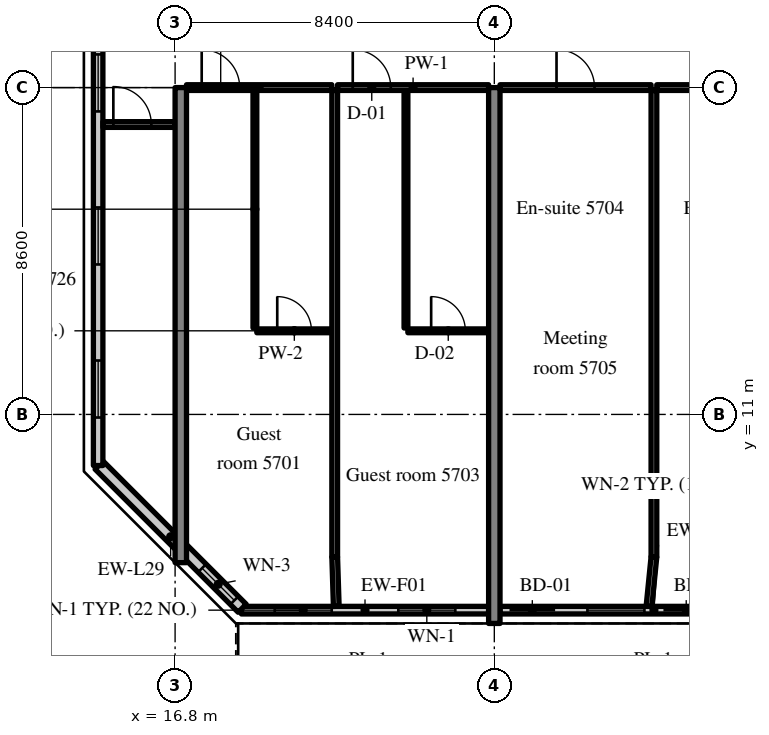
"""IFC4 building model, lengths in metres.
Left out: names, types, materials, properties, quantities, classifications, styles, units other than length and angle.
Written with IfcOpenShell. Run it as: python <this file> out.ifc"""

import sys

from ifc_helpers import new_model, si_unit, direction, frame, frame_2d, origin, place, context, subcontext, project, spatial, rectangle, extrude, source, transform, mapped, element, fill, save


model = new_model("IFC4")
c1 = context("Model", 3, precision=1e-05, world=origin(), true_north=direction((0.0, 1.0)))
c2 = subcontext(c1, "Body", "Model", "MODEL_VIEW")
j1 = project(units=[si_unit("LENGTHUNIT", "METRE"), si_unit("PLANEANGLEUNIT", "RADIAN")], contexts=[c1])
p1 = place(None, origin())
s1 = spatial("IfcSite", under=j1, at=p1, CompositionType="ELEMENT")
p2 = place(p1, origin())
s2 = spatial("IfcBuilding", under=s1, at=p2, CompositionType="ELEMENT")
p3 = place(p2, frame((0.0, 0.0, 237.4)))
s3 = spatial("IfcBuildingStorey", under=s2, at=p3, CompositionType="ELEMENT", Elevation=237.4)
m1 = source(origin(), c2, "Body", "SweptSolid", [
    extrude(rectangle(XDim=12.5, YDim=0.3, at=frame_2d((6.25, 0.0))), origin(), (0.0, 0.0, 1.0), 3.62),
])
p4 = place(p3, frame((16.95, 7.1, 0.0), z_axis=(0.0, 0.0, 1.0), x_axis=(0.0, 1.0, 0.0)))
e1 = element("IfcWall", 1, at=p4, inside=s3, PredefinedType="SHEAR", context=c2, shape_type="MappedRepresentation", body=[
    mapped(m1, transform((0.0, 0.0, 0.0), scale=1.0)),
])
m2 = source(origin(), c2, "Body", "SweptSolid", [
    extrude(rectangle(XDim=14.1, YDim=0.3, at=frame_2d((7.05, 0.0))), origin(), (0.0, 0.0, 1.0), 3.62),
])
p5 = place(p3, frame((25.2, 5.5, 0.0), z_axis=(0.0, 0.0, 1.0), x_axis=(0.0, 1.0, 0.0)))
e2 = element("IfcWall", 2, at=p5, inside=s3, PredefinedType="SHEAR", context=c2, shape_type="MappedRepresentation", body=[
    mapped(m2, transform((0.0, 0.0, 0.0), scale=1.0)),
])
m3 = source(origin(), c2, "Body", "SweptSolid", [
    extrude(rectangle(XDim=6.505, YDim=0.2, at=frame_2d((3.252, 0.0))), origin(), (0.0, 0.0, 1.0), 3.02),
])
p6 = place(p3, frame((18.545, 5.85, 0.0), z_axis=(0.0, 0.0, 1.0), x_axis=(1.0, 0.0, 0.0)))
e3 = element("IfcWall", 3, at=p6, inside=s3, PredefinedType="SOLIDWALL", context=c2, shape_type="MappedRepresentation", body=[
    mapped(m3, transform((0.0, 0.0, 0.0), scale=1.0)),
])
m4 = source(origin(), c2, "Body", "SweptSolid", [
    extrude(rectangle(XDim=1.5, YDim=1.5, at=frame_2d((0.75, 0.75))), frame((0.0, 0.11, 0.0), z_axis=(0.0, -1.0, 0.0), x_axis=(1.0, 0.0, 0.0)), (0.0, 0.0, 1.0), 0.22),
])
p7 = place(p6, frame((0.876, 0.0, 0.9)))
e4 = element("IfcOpeningElement", 4, at=p7, cuts=e3, PredefinedType="OPENING", context=c2, shape_type="MappedRepresentation", body=[
    mapped(m4, transform((0.0, 0.0, 0.0), scale=1.0)),
])
p8 = place(p6, frame((4.129, 0.0, 0.9)))
e5 = element("IfcOpeningElement", 5, at=p8, cuts=e3, PredefinedType="OPENING", context=c2, shape_type="MappedRepresentation", body=[
    mapped(m4, transform((0.0, 0.0, 0.0), scale=1.0)),
])
m5 = source(origin(), c2, "Body", "SweptSolid", [
    extrude(rectangle(XDim=8.1, YDim=0.2, at=frame_2d((4.05, 0.0))), origin(), (0.0, 0.0, 1.0), 3.02),
])
p9 = place(p3, frame((25.35, 5.85, 0.0), z_axis=(0.0, 0.0, 1.0), x_axis=(1.0, 0.0, 0.0)))
e6 = element("IfcWall", 6, at=p9, inside=s3, PredefinedType="SOLIDWALL", context=c2, shape_type="MappedRepresentation", body=[
    mapped(m5, transform((0.0, 0.0, 0.0), scale=1.0)),
])
m6 = source(origin(), c2, "Body", "SweptSolid", [
    extrude(rectangle(XDim=1.2, YDim=2.4, at=frame_2d((0.6, 1.2))), frame((0.0, 0.11, 0.0), z_axis=(0.0, -1.0, 0.0), x_axis=(1.0, 0.0, 0.0)), (0.0, 0.0, 1.0), 0.22),
])
p10 = place(p9, frame((0.25, 0.0, 0.0)))
e7 = element("IfcOpeningElement", 7, at=p10, cuts=e6, PredefinedType="OPENING", context=c2, shape_type="MappedRepresentation", body=[
    mapped(m6, transform((0.0, 0.0, 0.0), scale=1.0)),
])
p11 = place(p9, frame((2.3, 0.0, 0.9)))
e8 = element("IfcOpeningElement", 8, at=p11, cuts=e6, PredefinedType="OPENING", context=c2, shape_type="MappedRepresentation", body=[
    mapped(m4, transform((0.0, 0.0, 0.0), scale=1.0)),
])
p12 = place(p9, frame((4.3, 0.0, 0.0)))
e9 = element("IfcOpeningElement", 9, at=p12, cuts=e6, PredefinedType="OPENING", context=c2, shape_type="MappedRepresentation", body=[
    mapped(m6, transform((0.0, 0.0, 0.0), scale=1.0)),
])
p13 = place(p9, frame((6.35, 0.0, 0.9)))
e10 = element("IfcOpeningElement", 10, at=p13, cuts=e6, PredefinedType="OPENING", context=c2, shape_type="MappedRepresentation", body=[
    mapped(m4, transform((0.0, 0.0, 0.0), scale=1.0)),
])
m7 = source(origin(), c2, "Body", "SweptSolid", [
    extrude(rectangle(XDim=5.326, YDim=0.3, at=frame_2d((2.663, 0.0))), origin(), (0.0, 0.0, 1.0), 3.62),
])
p14 = place(p3, frame((14.8, 9.666, 0.0), z_axis=(0.0, 0.0, 1.0), x_axis=(0.707083859269, -0.707129702361, 0.0)))
e11 = element("IfcWall", 11, at=p14, inside=s3, PredefinedType="SOLIDWALL", context=c2, shape_type="MappedRepresentation", body=[
    mapped(m7, transform((0.0, 0.0, 0.0), scale=1.0)),
])
m8 = source(origin(), c2, "Body", "SweptSolid", [
    extrude(rectangle(XDim=1.2, YDim=1.5, at=frame_2d((0.6, 0.75))), frame((0.0, 0.16, 0.0), z_axis=(0.0, -1.0, 0.0), x_axis=(1.0, 0.0, 0.0)), (0.0, 0.0, 1.0), 0.32),
])
p15 = place(p14, frame((3.833, 0.0, 0.9)))
e12 = element("IfcOpeningElement", 12, at=p15, cuts=e11, PredefinedType="OPENING", context=c2, shape_type="MappedRepresentation", body=[
    mapped(m8, transform((0.0, 0.0, 0.0), scale=1.0)),
])
m9 = source(origin(), c2, "Body", "SweptSolid", [
    extrude(rectangle(XDim=28.189, YDim=0.25, at=frame_2d((14.095, 0.0))), origin(), (0.0, 0.0, 1.0), 3.62),
])
p16 = place(p3, frame((14.775, 37.845, 0.0), z_axis=(0.0, 0.0, 1.0), x_axis=(0.0, -1.0, 0.0)))
e13 = element("IfcWall", 13, at=p16, inside=s3, PredefinedType="SOLIDWALL", context=c2, shape_type="MappedRepresentation", body=[
    mapped(m9, transform((0.0, 0.0, 0.0), scale=1.0)),
])
m10 = source(origin(), c2, "Body", "SweptSolid", [
    extrude(rectangle(XDim=1.5, YDim=1.5, at=frame_2d((0.75, 0.75))), frame((0.0, 0.135, 0.0), z_axis=(0.0, -1.0, 0.0), x_axis=(1.0, 0.0, 0.0)), (0.0, 0.0, 1.0), 0.27),
])
p17 = place(p16, frame((1.263, 0.0, 0.9)))
e14 = element("IfcOpeningElement", 14, at=p17, cuts=e13, PredefinedType="OPENING", context=c2, shape_type="MappedRepresentation", body=[
    mapped(m10, transform((0.0, 0.0, 0.0), scale=1.0)),
])
p18 = place(p16, frame((5.291, 0.0, 0.9)))
e15 = element("IfcOpeningElement", 15, at=p18, cuts=e13, PredefinedType="OPENING", context=c2, shape_type="MappedRepresentation", body=[
    mapped(m10, transform((0.0, 0.0, 0.0), scale=1.0)),
])
p19 = place(p16, frame((9.318, 0.0, 0.9)))
e16 = element("IfcOpeningElement", 16, at=p19, cuts=e13, PredefinedType="OPENING", context=c2, shape_type="MappedRepresentation", body=[
    mapped(m10, transform((0.0, 0.0, 0.0), scale=1.0)),
])
p20 = place(p16, frame((13.345, 0.0, 0.9)))
e17 = element("IfcOpeningElement", 17, at=p20, cuts=e13, PredefinedType="OPENING", context=c2, shape_type="MappedRepresentation", body=[
    mapped(m10, transform((0.0, 0.0, 0.0), scale=1.0)),
])
p21 = place(p16, frame((17.372, 0.0, 0.9)))
e18 = element("IfcOpeningElement", 18, at=p21, cuts=e13, PredefinedType="OPENING", context=c2, shape_type="MappedRepresentation", body=[
    mapped(m10, transform((0.0, 0.0, 0.0), scale=1.0)),
])
p22 = place(p16, frame((21.399, 0.0, 0.9)))
e19 = element("IfcOpeningElement", 19, at=p22, cuts=e13, PredefinedType="OPENING", context=c2, shape_type="MappedRepresentation", body=[
    mapped(m10, transform((0.0, 0.0, 0.0), scale=1.0)),
])
p23 = place(p16, frame((25.426, 0.0, 0.9)))
e20 = element("IfcOpeningElement", 20, at=p23, cuts=e13, PredefinedType="OPENING", context=c2, shape_type="MappedRepresentation", body=[
    mapped(m10, transform((0.0, 0.0, 0.0), scale=1.0)),
])
m11 = source(origin(), c2, "Body", "SweptSolid", [
    extrude(rectangle(XDim=6.25, YDim=0.1, at=frame_2d((3.125, 0.0))), origin(), (0.0, 0.0, 1.0), 3.62),
])
p24 = place(p3, frame((18.9, 13.275, 0.0), z_axis=(0.0, 0.0, 1.0), x_axis=(0.0, 1.0, 0.0)))
e21 = element("IfcWall", 21, at=p24, inside=s3, PredefinedType="PARTITIONING", context=c2, shape_type="MappedRepresentation", body=[
    mapped(m11, transform((0.0, 0.0, 0.0), scale=1.0)),
])
m12 = source(origin(), c2, "Body", "SweptSolid", [
    extrude(rectangle(XDim=1.975, YDim=0.1, at=frame_2d((0.988, 0.0))), origin(), (0.0, 0.0, 1.0), 3.62),
])
p25 = place(p3, frame((18.95, 13.2, 0.0), z_axis=(0.0, 0.0, 1.0), x_axis=(1.0, 0.0, 0.0)))
e22 = element("IfcWall", 22, at=p25, inside=s3, PredefinedType="PARTITIONING", context=c2, shape_type="MappedRepresentation", body=[
    mapped(m12, transform((0.0, 0.0, 0.0), scale=1.0)),
])
m13 = source(origin(), c2, "Body", "SweptSolid", [
    extrude(rectangle(XDim=0.9, YDim=2.1, at=frame_2d((0.45, 1.05))), frame((0.0, 0.06, 0.0), z_axis=(0.0, -1.0, 0.0), x_axis=(1.0, 0.0, 0.0)), (0.0, 0.0, 1.0), 0.12),
])
p26 = place(p25, frame((0.538, 0.0, 0.0)))
e23 = element("IfcOpeningElement", 23, at=p26, cuts=e22, PredefinedType="OPENING", context=c2, shape_type="MappedRepresentation", body=[
    mapped(m13, transform((0.0, 0.0, 0.0), scale=1.0)),
])
m14 = source(origin(), c2, "Body", "SweptSolid", [
    extrude(rectangle(XDim=3.825, YDim=0.15, at=frame_2d((1.913, 0.0))), origin(), (0.0, 0.0, 1.0), 2.92),
])
p27 = place(p3, frame((17.1, 19.6, 0.0), z_axis=(0.0, 0.0, 1.0), x_axis=(1.0, 0.0, 0.0)))
e24 = element("IfcWall", 24, at=p27, inside=s3, PredefinedType="PARTITIONING", context=c2, shape_type="MappedRepresentation", body=[
    mapped(m14, transform((0.0, 0.0, 0.0), scale=1.0)),
])
m15 = source(origin(), c2, "Body", "SweptSolid", [
    extrude(rectangle(XDim=1.0, YDim=2.1, at=frame_2d((0.5, 1.05))), frame((0.0, 0.085, 0.0), z_axis=(0.0, -1.0, 0.0), x_axis=(1.0, 0.0, 0.0)), (0.0, 0.0, 1.0), 0.17),
])
p28 = place(p27, frame((0.4, 0.0, 0.0)))
e25 = element("IfcOpeningElement", 25, at=p28, cuts=e24, PredefinedType="OPENING", context=c2, shape_type="MappedRepresentation", body=[
    mapped(m15, transform((0.0, 0.0, 0.0), scale=1.0)),
])
p29 = place(p3, frame((22.875, 13.275, 0.0), z_axis=(0.0, 0.0, 1.0), x_axis=(0.0, 1.0, 0.0)))
e26 = element("IfcWall", 26, at=p29, inside=s3, PredefinedType="PARTITIONING", context=c2, shape_type="MappedRepresentation", body=[
    mapped(m11, transform((0.0, 0.0, 0.0), scale=1.0)),
])
m16 = source(origin(), c2, "Body", "SweptSolid", [
    extrude(rectangle(XDim=2.125, YDim=0.1, at=frame_2d((1.062, 0.0))), origin(), (0.0, 0.0, 1.0), 3.62),
])
p30 = place(p3, frame((22.925, 13.2, 0.0), z_axis=(0.0, 0.0, 1.0), x_axis=(1.0, 0.0, 0.0)))
e27 = element("IfcWall", 27, at=p30, inside=s3, PredefinedType="PARTITIONING", context=c2, shape_type="MappedRepresentation", body=[
    mapped(m16, transform((0.0, 0.0, 0.0), scale=1.0)),
])
p31 = place(p30, frame((0.613, 0.0, 0.0)))
e28 = element("IfcOpeningElement", 28, at=p31, cuts=e27, PredefinedType="OPENING", context=c2, shape_type="MappedRepresentation", body=[
    mapped(m13, transform((0.0, 0.0, 0.0), scale=1.0)),
])
m17 = source(origin(), c2, "Body", "SweptSolid", [
    extrude(rectangle(XDim=3.975, YDim=0.15, at=frame_2d((1.988, 0.0))), origin(), (0.0, 0.0, 1.0), 2.92),
])
p32 = place(p3, frame((21.075, 19.6, 0.0), z_axis=(0.0, 0.0, 1.0), x_axis=(1.0, 0.0, 0.0)))
e29 = element("IfcWall", 29, at=p32, inside=s3, PredefinedType="PARTITIONING", context=c2, shape_type="MappedRepresentation", body=[
    mapped(m17, transform((0.0, 0.0, 0.0), scale=1.0)),
])
p33 = place(p32, frame((0.4, 0.0, 0.0)))
e30 = element("IfcOpeningElement", 30, at=p33, cuts=e29, PredefinedType="OPENING", context=c2, shape_type="MappedRepresentation", body=[
    mapped(m15, transform((0.0, 0.0, 0.0), scale=1.0)),
])
m18 = source(origin(), c2, "Body", "SweptSolid", [
    extrude(rectangle(XDim=12.275, YDim=0.15, at=frame_2d((6.137, 0.0))), origin(), (0.0, 0.0, 1.0), 3.62),
])
p34 = place(p3, frame((21.0, 7.25, 0.0), z_axis=(0.0, 0.0, 1.0), x_axis=(0.0, 1.0, 0.0)))
e31 = element("IfcWall", 31, at=p34, inside=s3, PredefinedType="PARTITIONING", context=c2, shape_type="MappedRepresentation", body=[
    mapped(m18, transform((0.0, 0.0, 0.0), scale=1.0)),
])
m19 = source(origin(), c2, "Body", "SweptSolid", [
    extrude(rectangle(XDim=3.975, YDim=0.15, at=frame_2d((1.987, 0.0))), origin(), (0.0, 0.0, 1.0), 2.92),
])
p35 = place(p3, frame((25.35, 19.6, 0.0), z_axis=(0.0, 0.0, 1.0), x_axis=(1.0, 0.0, 0.0)))
e32 = element("IfcWall", 32, at=p35, inside=s3, PredefinedType="PARTITIONING", context=c2, shape_type="MappedRepresentation", body=[
    mapped(m19, transform((0.0, 0.0, 0.0), scale=1.0)),
])
p36 = place(p35, frame((1.487, 0.0, 0.0)))
e33 = element("IfcOpeningElement", 33, at=p36, cuts=e32, PredefinedType="OPENING", context=c2, shape_type="MappedRepresentation", body=[
    mapped(m15, transform((0.0, 0.0, 0.0), scale=1.0)),
])
p37 = place(p3, frame((29.475, 19.6, 0.0), z_axis=(0.0, 0.0, 1.0), x_axis=(1.0, 0.0, 0.0)))
e34 = element("IfcWall", 34, at=p37, inside=s3, PredefinedType="PARTITIONING", context=c2, shape_type="MappedRepresentation", body=[
    mapped(m19, transform((0.0, 0.0, 0.0), scale=1.0)),
])
p38 = place(p37, frame((1.487, 0.0, 0.0)))
e35 = element("IfcOpeningElement", 35, at=p38, cuts=e34, PredefinedType="OPENING", context=c2, shape_type="MappedRepresentation", body=[
    mapped(m15, transform((0.0, 0.0, 0.0), scale=1.0)),
])
p39 = place(p3, frame((29.4, 7.25, 0.0), z_axis=(0.0, 0.0, 1.0), x_axis=(0.0, 1.0, 0.0)))
e36 = element("IfcWall", 36, at=p39, inside=s3, PredefinedType="PARTITIONING", context=c2, shape_type="MappedRepresentation", body=[
    mapped(m18, transform((0.0, 0.0, 0.0), scale=1.0)),
])
m20 = source(origin(), c2, "Body", "SweptSolid", [
    extrude(rectangle(XDim=1.9, YDim=0.15, at=frame_2d((0.95, 0.0))), origin(), (0.0, 0.0, 1.0), 2.92),
])
p40 = place(p3, frame((14.9, 18.628, 0.0), z_axis=(0.0, 0.0, 1.0), x_axis=(1.0, 0.0, 0.0)))
e37 = element("IfcWall", 37, at=p40, inside=s3, PredefinedType="PARTITIONING", context=c2, shape_type="MappedRepresentation", body=[
    mapped(m20, transform((0.0, 0.0, 0.0), scale=1.0)),
])
p41 = place(p40, frame((0.275, 0.0, 0.0)))
e38 = element("IfcOpeningElement", 38, at=p41, cuts=e37, PredefinedType="OPENING", context=c2, shape_type="MappedRepresentation", body=[
    mapped(m15, transform((0.0, 0.0, 0.0), scale=1.0)),
])
m21 = source(origin(), c2, "Body", "SweptSolid", [
    extrude(rectangle(XDim=1.301, YDim=0.15, at=frame_2d((0.65, 0.0))), origin(), (0.0, 0.0, 1.0), 3.62),
])
p42 = place(p3, frame((21.041, 5.95, 0.0), z_axis=(0.0, 0.0, 1.0), x_axis=(-0.031533606063, 0.999502692187, 0.0)))
e39 = element("IfcWall", 39, at=p42, inside=s3, PredefinedType="PARTITIONING", context=c2, shape_type="MappedRepresentation", body=[
    mapped(m21, transform((0.0, 0.0, 0.0), scale=1.0)),
])
m22 = source(origin(), c2, "Body", "SweptSolid", [
    extrude(rectangle(XDim=1.307, YDim=0.15, at=frame_2d((0.653, 0.0))), origin(), (0.0, 0.0, 1.0), 3.62),
])
p43 = place(p3, frame((29.27, 5.95, 0.0), z_axis=(0.0, 0.0, 1.0), x_axis=(0.099411212066, 0.995046436562, 0.0)))
e40 = element("IfcWall", 40, at=p43, inside=s3, PredefinedType="PARTITIONING", context=c2, shape_type="MappedRepresentation", body=[
    mapped(m22, transform((0.0, 0.0, 0.0), scale=1.0)),
])
m23 = source(origin(), c2, "Body", "SweptSolid", [
    extrude(rectangle(XDim=1.5, YDim=1.5, at=frame_2d((0.75, 0.75))), frame((0.0, 0.03, 0.0), z_axis=(0.0, -1.0, 0.0), x_axis=(1.0, 0.0, 0.0)), (0.0, 0.0, 1.0), 0.06),
])
p44 = place(p7, origin())
e41 = element("IfcWindow", 41, at=p44, inside=s3, PartitioningType="SINGLE_PANEL", PredefinedType="WINDOW", context=c2, shape_type="MappedRepresentation", body=[
    mapped(m23, transform((0.0, 0.0, 0.0), scale=1.0)),
])
fill(e4, e41)
p45 = place(p8, origin())
e42 = element("IfcWindow", 42, at=p45, inside=s3, PartitioningType="SINGLE_PANEL", PredefinedType="WINDOW", context=c2, shape_type="MappedRepresentation", body=[
    mapped(m23, transform((0.0, 0.0, 0.0), scale=1.0)),
])
fill(e5, e42)
m24 = source(origin(), c2, "Body", "SweptSolid", [
    extrude(rectangle(XDim=1.2, YDim=2.4, at=frame_2d((0.6, 1.2))), frame((0.0, 0.025, 0.0), z_axis=(0.0, -1.0, 0.0), x_axis=(1.0, 0.0, 0.0)), (0.0, 0.0, 1.0), 0.05),
])
p46 = place(p10, origin())
e43 = element("IfcDoor", 43, at=p46, inside=s3, OperationType="SLIDING_TO_LEFT", PredefinedType="DOOR", context=c2, shape_type="MappedRepresentation", body=[
    mapped(m24, transform((0.0, 0.0, 0.0), scale=1.0)),
])
fill(e7, e43)
p47 = place(p11, origin())
e44 = element("IfcWindow", 44, at=p47, inside=s3, PartitioningType="SINGLE_PANEL", PredefinedType="WINDOW", context=c2, shape_type="MappedRepresentation", body=[
    mapped(m23, transform((0.0, 0.0, 0.0), scale=1.0)),
])
fill(e8, e44)
p48 = place(p12, origin())
e45 = element("IfcDoor", 45, at=p48, inside=s3, OperationType="SLIDING_TO_RIGHT", PredefinedType="DOOR", context=c2, shape_type="MappedRepresentation", body=[
    mapped(m24, transform((0.0, 0.0, 0.0), scale=1.0)),
])
fill(e9, e45)
m25 = source(origin(), c2, "Body", "SweptSolid", [
    extrude(rectangle(XDim=1.2, YDim=1.5, at=frame_2d((0.6, 0.75))), frame((0.0, 0.03, 0.0), z_axis=(0.0, -1.0, 0.0), x_axis=(1.0, 0.0, 0.0)), (0.0, 0.0, 1.0), 0.06),
])
p49 = place(p15, origin())
e46 = element("IfcWindow", 46, at=p49, inside=s3, PartitioningType="SINGLE_PANEL", PredefinedType="WINDOW", context=c2, shape_type="MappedRepresentation", body=[
    mapped(m25, transform((0.0, 0.0, 0.0), scale=1.0)),
])
fill(e12, e46)
p50 = place(p21, origin())
e47 = element("IfcWindow", 47, at=p50, inside=s3, PartitioningType="SINGLE_PANEL", PredefinedType="WINDOW", context=c2, shape_type="MappedRepresentation", body=[
    mapped(m23, transform((0.0, 0.0, 0.0), scale=1.0)),
])
fill(e18, e47)
p51 = place(p22, origin())
e48 = element("IfcWindow", 48, at=p51, inside=s3, PartitioningType="SINGLE_PANEL", PredefinedType="WINDOW", context=c2, shape_type="MappedRepresentation", body=[
    mapped(m23, transform((0.0, 0.0, 0.0), scale=1.0)),
])
fill(e19, e48)
p52 = place(p23, origin())
e49 = element("IfcWindow", 49, at=p52, inside=s3, PartitioningType="SINGLE_PANEL", PredefinedType="WINDOW", context=c2, shape_type="MappedRepresentation", body=[
    mapped(m23, transform((0.0, 0.0, 0.0), scale=1.0)),
])
fill(e20, e49)
m26 = source(origin(), c2, "Body", "SweptSolid", [
    extrude(rectangle(XDim=0.9, YDim=2.1, at=frame_2d((0.45, 1.05))), frame((0.0, 0.025, 0.0), z_axis=(0.0, -1.0, 0.0), x_axis=(1.0, 0.0, 0.0)), (0.0, 0.0, 1.0), 0.05),
])
p53 = place(p26, origin())
e50 = element("IfcDoor", 50, at=p53, inside=s3, OperationType="SINGLE_SWING_LEFT", PredefinedType="DOOR", context=c2, shape_type="MappedRepresentation", body=[
    mapped(m26, transform((0.0, 0.0, 0.0), scale=1.0)),
])
fill(e23, e50)
m27 = source(origin(), c2, "Body", "SweptSolid", [
    extrude(rectangle(XDim=1.0, YDim=2.1, at=frame_2d((0.5, 1.05))), frame((0.0, 0.025, 0.0), z_axis=(0.0, -1.0, 0.0), x_axis=(1.0, 0.0, 0.0)), (0.0, 0.0, 1.0), 0.05),
])
p54 = place(p28, origin())
e51 = element("IfcDoor", 51, at=p54, inside=s3, OperationType="SINGLE_SWING_LEFT", PredefinedType="DOOR", context=c2, shape_type="MappedRepresentation", body=[
    mapped(m27, transform((0.0, 0.0, 0.0), scale=1.0)),
])
fill(e25, e51)
p55 = place(p31, origin())
e52 = element("IfcDoor", 52, at=p55, inside=s3, OperationType="SINGLE_SWING_LEFT", PredefinedType="DOOR", context=c2, shape_type="MappedRepresentation", body=[
    mapped(m26, transform((0.0, 0.0, 0.0), scale=1.0)),
])
fill(e28, e52)
p56 = place(p33, origin())
e53 = element("IfcDoor", 53, at=p56, inside=s3, OperationType="SINGLE_SWING_LEFT", PredefinedType="DOOR", context=c2, shape_type="MappedRepresentation", body=[
    mapped(m27, transform((0.0, 0.0, 0.0), scale=1.0)),
])
fill(e30, e53)
p57 = place(p36, origin())
e54 = element("IfcDoor", 54, at=p57, inside=s3, OperationType="SINGLE_SWING_LEFT", PredefinedType="DOOR", context=c2, shape_type="MappedRepresentation", body=[
    mapped(m27, transform((0.0, 0.0, 0.0), scale=1.0)),
])
fill(e33, e54)
p58 = place(p41, origin())
e55 = element("IfcDoor", 55, at=p58, inside=s3, OperationType="SINGLE_SWING_LEFT", PredefinedType="DOOR", context=c2, shape_type="MappedRepresentation", body=[
    mapped(m27, transform((0.0, 0.0, 0.0), scale=1.0)),
])
fill(e38, e55)
save(model, sys.argv[1])
